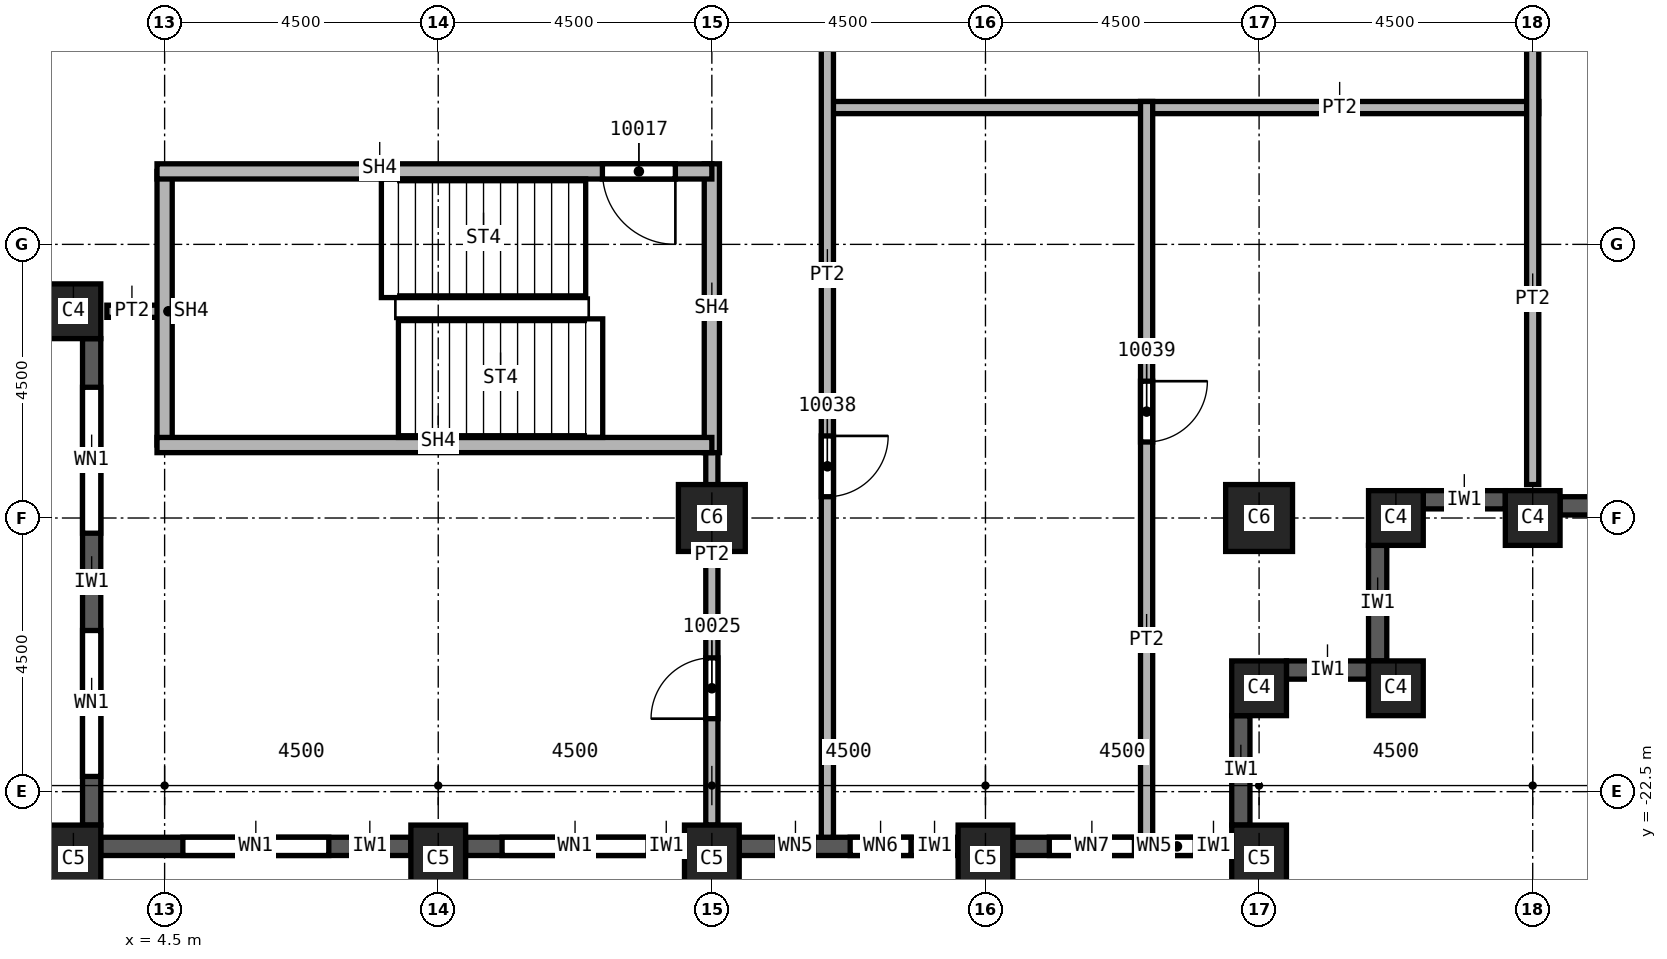
"""IFC4 building model, lengths in metres.
Left out: names, types, materials, properties, quantities, classifications, styles, units other than length and angle.
Written with IfcOpenShell. Run it as: python <this file> out.ifc"""

import sys

from ifc_helpers import new_model, si_unit, direction, frame, frame_2d, origin, origin_2d, place, context, subcontext, project, spatial, rectangle, extrude, element, fill, save


model = new_model("IFC4")
c1 = context("Model", 3, precision=1e-05, world=origin(), true_north=direction((0.0, 1.0)))
c2 = subcontext(c1, "Body", "Model", "MODEL_VIEW")
j1 = project(units=[si_unit("LENGTHUNIT", "METRE"), si_unit("PLANEANGLEUNIT", "RADIAN")], contexts=[c1])
p1 = place(None, origin())
s1 = spatial("IfcSite", under=j1, at=p1, CompositionType="ELEMENT")
p2 = place(p1, origin())
s2 = spatial("IfcBuilding", under=s1, at=p2, CompositionType="ELEMENT")
p3 = place(p2, frame((0.0, 0.0, 174.0)))
s3 = spatial("IfcBuildingStorey", under=s2, at=p3, CompositionType="ELEMENT", Elevation=174.0)
for number, where, z_axis, x_axis in (
    (1, (13.5, -18.0, 0.0), (0.0, 0.0, 1.0), (1.0, 0.0, 0.0)),
    (2, (22.5, -18.0, 0.0), (0.0, 0.0, 1.0), (1.0, 0.0, 0.0)),
):
    element("IfcColumn", number, at=place(p3, frame(where, z_axis=z_axis, x_axis=x_axis)), inside=s3, PredefinedType="COLUMN", context=c2, shape_type="SweptSolid", body=[
        extrude(rectangle(XDim=1.1, YDim=1.1, at=origin_2d()), origin(), (0.0, 0.0, 1.0), 3.59),
    ])
p4 = place(p3, frame((27.0, -18.0, 0.0), z_axis=(0.0, 0.0, 1.0), x_axis=(1.0, 0.0, 0.0)))
e3 = element("IfcColumn", 3, at=p4, inside=s3, PredefinedType="COLUMN", context=c2, shape_type="SweptSolid", body=[
    extrude(rectangle(XDim=0.9, YDim=0.9, at=origin_2d()), origin(), (0.0, 0.0, 1.0), 3.59),
])
for number, where, z_axis, x_axis in (
    (4, (3.0, -23.6, 0.0), (0.0, 0.0, 1.0), (1.0, 0.0, 0.0)),
    (5, (9.0, -23.6, 0.0), (0.0, 0.0, 1.0), (1.0, 0.0, 0.0)),
    (6, (13.5, -23.6, 0.0), (0.0, 0.0, 1.0), (1.0, 0.0, 0.0)),
    (7, (18.0, -23.6, 0.0), (0.0, 0.0, 1.0), (1.0, 0.0, 0.0)),
    (8, (22.5, -23.6, 0.0), (0.0, 0.0, 1.0), (1.0, 0.0, 0.0)),
):
    element("IfcColumn", number, at=place(p3, frame(where, z_axis=z_axis, x_axis=x_axis)), inside=s3, PredefinedType="COLUMN", context=c2, shape_type="SweptSolid", body=[
        extrude(rectangle(XDim=0.9, YDim=1.1, at=origin_2d()), origin(), (0.0, 0.0, 1.0), 3.59),
    ])
for number, where, z_axis, x_axis in (
    (9, (3.0, -14.6, 0.0), (0.0, 0.0, 1.0), (1.0, 0.0, 0.0)),
    (10, (22.5, -20.8, 0.0), (0.0, 0.0, 1.0), (1.0, 0.0, 0.0)),
    (11, (24.75, -20.8, 0.0), (0.0, 0.0, 1.0), (1.0, 0.0, 0.0)),
    (12, (24.75, -18.0, 0.0), (0.0, 0.0, 1.0), (1.0, 0.0, 0.0)),
):
    element("IfcColumn", number, at=place(p3, frame(where, z_axis=z_axis, x_axis=x_axis)), inside=s3, PredefinedType="COLUMN", context=c2, shape_type="SweptSolid", body=[
        extrude(rectangle(XDim=0.9, YDim=0.9, at=origin_2d()), origin(), (0.0, 0.0, 1.0), 3.59),
    ])
p5 = place(p3, frame((3.3, -15.05, 0.0), z_axis=(0.0, 0.0, 1.0), x_axis=(0.0, -1.0, 0.0)))
e13 = element("IfcWall", 13, at=p5, inside=s3, PredefinedType="SOLIDWALL", context=c2, shape_type="SweptSolid", body=[
    extrude(rectangle(XDim=8.0, YDim=0.3, at=frame_2d((4.0, 0.0))), origin(), (0.0, 0.0, 1.0), 2.99),
])
p6 = place(p5, frame((0.8, 0.0, 0.8)))
e14 = element("IfcOpeningElement", 14, at=p6, cuts=e13, PredefinedType="OPENING", context=c2, shape_type="SweptSolid", body=[
    extrude(rectangle(XDim=2.4, YDim=1.95, at=frame_2d((1.2, 0.975))), frame((0.0, 0.15, 0.0), z_axis=(0.0, -1.0, 0.0), x_axis=(1.0, 0.0, 0.0)), (0.0, 0.0, 1.0), 0.3),
])
p7 = place(p5, frame((4.8, 0.0, 0.8)))
e15 = element("IfcOpeningElement", 15, at=p7, cuts=e13, PredefinedType="OPENING", context=c2, shape_type="SweptSolid", body=[
    extrude(rectangle(XDim=2.4, YDim=1.95, at=frame_2d((1.2, 0.975))), frame((0.0, 0.15, 0.0), z_axis=(0.0, -1.0, 0.0), x_axis=(1.0, 0.0, 0.0)), (0.0, 0.0, 1.0), 0.3),
])
p8 = place(p3, frame((3.45, -23.4, 0.0), z_axis=(0.0, 0.0, 1.0), x_axis=(1.0, 0.0, 0.0)))
e16 = element("IfcWall", 16, at=p8, inside=s3, PredefinedType="SOLIDWALL", context=c2, shape_type="SweptSolid", body=[
    extrude(rectangle(XDim=5.1, YDim=0.3, at=frame_2d((2.55, 0.0))), origin(), (0.0, 0.0, 1.0), 2.99),
])
p9 = place(p8, frame((1.35, 0.0, 0.8)))
e17 = element("IfcOpeningElement", 17, at=p9, cuts=e16, PredefinedType="OPENING", context=c2, shape_type="SweptSolid", body=[
    extrude(rectangle(XDim=2.4, YDim=1.95, at=frame_2d((1.2, 0.975))), frame((0.0, 0.15, 0.0), z_axis=(0.0, -1.0, 0.0), x_axis=(1.0, 0.0, 0.0)), (0.0, 0.0, 1.0), 0.3),
])
p10 = place(p3, frame((9.45, -23.4, 0.0), z_axis=(0.0, 0.0, 1.0), x_axis=(1.0, 0.0, 0.0)))
e18 = element("IfcWall", 18, at=p10, inside=s3, PredefinedType="SOLIDWALL", context=c2, shape_type="SweptSolid", body=[
    extrude(rectangle(XDim=3.6, YDim=0.3, at=frame_2d((1.8, 0.0))), origin(), (0.0, 0.0, 1.0), 2.99),
])
p11 = place(p10, frame((0.6, 0.0, 0.8)))
e19 = element("IfcOpeningElement", 19, at=p11, cuts=e18, PredefinedType="OPENING", context=c2, shape_type="SweptSolid", body=[
    extrude(rectangle(XDim=2.4, YDim=1.95, at=frame_2d((1.2, 0.975))), frame((0.0, 0.15, 0.0), z_axis=(0.0, -1.0, 0.0), x_axis=(1.0, 0.0, 0.0)), (0.0, 0.0, 1.0), 0.3),
])
p12 = place(p3, frame((13.95, -23.4, 0.0), z_axis=(0.0, 0.0, 1.0), x_axis=(1.0, 0.0, 0.0)))
e20 = element("IfcWall", 20, at=p12, inside=s3, PredefinedType="SOLIDWALL", context=c2, shape_type="SweptSolid", body=[
    extrude(rectangle(XDim=3.6, YDim=0.3, at=frame_2d((1.8, 0.0))), origin(), (0.0, 0.0, 1.0), 2.99),
])
p13 = place(p12, frame((0.625, 0.0, 0.8)))
e21 = element("IfcOpeningElement", 21, at=p13, cuts=e20, PredefinedType="OPENING", context=c2, shape_type="SweptSolid", body=[
    extrude(rectangle(XDim=0.6, YDim=1.95, at=frame_2d((0.3, 0.975))), frame((0.0, 0.15, 0.0), z_axis=(0.0, -1.0, 0.0), x_axis=(1.0, 0.0, 0.0)), (0.0, 0.0, 1.0), 0.3),
])
p14 = place(p12, frame((1.825, 0.0, 0.8)))
e22 = element("IfcOpeningElement", 22, at=p14, cuts=e20, PredefinedType="OPENING", context=c2, shape_type="SweptSolid", body=[
    extrude(rectangle(XDim=1.0, YDim=1.95, at=frame_2d((0.5, 0.975))), frame((0.0, 0.15, 0.0), z_axis=(0.0, -1.0, 0.0), x_axis=(1.0, 0.0, 0.0)), (0.0, 0.0, 1.0), 0.3),
])
p15 = place(p3, frame((18.45, -23.4, 0.0), z_axis=(0.0, 0.0, 1.0), x_axis=(1.0, 0.0, 0.0)))
e23 = element("IfcWall", 23, at=p15, inside=s3, PredefinedType="SOLIDWALL", context=c2, shape_type="SweptSolid", body=[
    extrude(rectangle(XDim=3.6, YDim=0.3, at=frame_2d((1.8, 0.0))), origin(), (0.0, 0.0, 1.0), 2.99),
])
p16 = place(p15, frame((0.6, 0.0, 0.8)))
e24 = element("IfcOpeningElement", 24, at=p16, cuts=e23, PredefinedType="OPENING", context=c2, shape_type="SweptSolid", body=[
    extrude(rectangle(XDim=1.4, YDim=1.95, at=frame_2d((0.7, 0.975))), frame((0.0, 0.15, 0.0), z_axis=(0.0, -1.0, 0.0), x_axis=(1.0, 0.0, 0.0)), (0.0, 0.0, 1.0), 0.3),
])
p17 = place(p15, frame((2.4, 0.0, 0.8)))
e25 = element("IfcOpeningElement", 25, at=p17, cuts=e23, PredefinedType="OPENING", context=c2, shape_type="SweptSolid", body=[
    extrude(rectangle(XDim=0.6, YDim=1.95, at=frame_2d((0.3, 0.975))), frame((0.0, 0.15, 0.0), z_axis=(0.0, -1.0, 0.0), x_axis=(1.0, 0.0, 0.0)), (0.0, 0.0, 1.0), 0.3),
])
p18 = place(p3, frame((22.2, -23.05, 0.0), z_axis=(0.0, 0.0, 1.0), x_axis=(0.0, 1.0, 0.0)))
e26 = element("IfcWall", 26, at=p18, inside=s3, PredefinedType="SOLIDWALL", context=c2, shape_type="SweptSolid", body=[
    extrude(rectangle(XDim=1.8, YDim=0.3, at=frame_2d((0.9, 0.0))), origin(), (0.0, 0.0, 1.0), 2.99),
])
p19 = place(p3, frame((22.95, -20.5, 0.0), z_axis=(0.0, 0.0, 1.0), x_axis=(1.0, 0.0, 0.0)))
e27 = element("IfcWall", 27, at=p19, inside=s3, PredefinedType="SOLIDWALL", context=c2, shape_type="SweptSolid", body=[
    extrude(rectangle(XDim=1.35, YDim=0.3, at=frame_2d((0.675, 0.0))), origin(), (0.0, 0.0, 1.0), 2.99),
])
p20 = place(p3, frame((24.45, -20.35, 0.0), z_axis=(0.0, 0.0, 1.0), x_axis=(0.0, 1.0, 0.0)))
e28 = element("IfcWall", 28, at=p20, inside=s3, PredefinedType="SOLIDWALL", context=c2, shape_type="SweptSolid", body=[
    extrude(rectangle(XDim=1.9, YDim=0.3, at=frame_2d((0.95, 0.0))), origin(), (0.0, 0.0, 1.0), 2.99),
])
p21 = place(p3, frame((25.2, -17.7, 0.0), z_axis=(0.0, 0.0, 1.0), x_axis=(1.0, 0.0, 0.0)))
e29 = element("IfcWall", 29, at=p21, inside=s3, PredefinedType="SOLIDWALL", context=c2, shape_type="SweptSolid", body=[
    extrude(rectangle(XDim=1.35, YDim=0.3, at=frame_2d((0.675, 0.0))), origin(), (0.0, 0.0, 1.0), 2.99),
])
p22 = place(p3, frame((27.45, -17.8, 0.0), z_axis=(0.0, 0.0, 1.0), x_axis=(1.0, 0.0, 0.0)))
e30 = element("IfcWall", 30, at=p22, inside=s3, PredefinedType="SOLIDWALL", context=c2, shape_type="SweptSolid", body=[
    extrude(rectangle(XDim=3.6, YDim=0.3, at=frame_2d((1.8, 0.0))), origin(), (0.0, 0.0, 1.0), 2.99),
])
p23 = place(p22, frame((0.6, 0.0, 0.8)))
e31 = element("IfcOpeningElement", 31, at=p23, cuts=e30, PredefinedType="OPENING", context=c2, shape_type="SweptSolid", body=[
    extrude(rectangle(XDim=2.4, YDim=1.95, at=frame_2d((1.2, 0.975))), frame((0.0, 0.15, 0.0), z_axis=(0.0, -1.0, 0.0), x_axis=(1.0, 0.0, 0.0)), (0.0, 0.0, 1.0), 0.3),
])
p24 = place(p3, frame((4.5, -14.6, 0.0), z_axis=(0.0, 0.0, 1.0), x_axis=(-1.0, 0.0, 0.0)))
e32 = element("IfcWall", 32, at=p24, inside=s3, PredefinedType="PARTITIONING", context=c2, shape_type="SweptSolid", body=[
    extrude(rectangle(XDim=0.95, YDim=0.2, at=frame_2d((0.475, 0.0))), origin(), (0.0, 0.0, 1.0), 3.59),
])
p25 = place(p3, frame((13.5, -23.05, 0.0), z_axis=(0.0, 0.0, 1.0), x_axis=(0.0, 1.0, 0.0)))
e33 = element("IfcWall", 33, at=p25, inside=s3, PredefinedType="PARTITIONING", context=c2, shape_type="SweptSolid", body=[
    extrude(rectangle(XDim=6.375, YDim=0.2, at=frame_2d((3.188, 0.0))), origin(), (0.0, 0.0, 1.0), 3.59),
])
p26 = place(p25, frame((1.75, 0.0, 0.0)))
e34 = element("IfcOpeningElement", 34, at=p26, cuts=e33, PredefinedType="OPENING", context=c2, shape_type="SweptSolid", body=[
    extrude(rectangle(XDim=1.0, YDim=2.1, at=frame_2d((0.5, 1.05))), frame((0.0, 0.1, 0.0), z_axis=(0.0, -1.0, 0.0), x_axis=(1.0, 0.0, 0.0)), (0.0, 0.0, 1.0), 0.2),
])
p27 = place(p3, frame((15.4, -11.25, 0.0), z_axis=(0.0, 0.0, 1.0), x_axis=(1.0, 0.0, 0.0)))
e35 = element("IfcWall", 35, at=p27, inside=s3, PredefinedType="PARTITIONING", context=c2, shape_type="SweptSolid", body=[
    extrude(rectangle(XDim=11.7, YDim=0.2, at=frame_2d((5.85, 0.0))), origin(), (0.0, 0.0, 1.0), 3.59),
])
p28 = place(p3, frame((15.4, -3.65, 0.0), z_axis=(0.0, 0.0, 1.0), x_axis=(0.0, -1.0, 0.0)))
e36 = element("IfcWall", 36, at=p28, inside=s3, PredefinedType="PARTITIONING", context=c2, shape_type="SweptSolid", body=[
    extrude(rectangle(XDim=19.6, YDim=0.2, at=frame_2d((9.8, 0.0))), origin(), (0.0, 0.0, 1.0), 3.59),
])
p29 = place(p28, frame((13.0, 0.0, 0.0)))
e37 = element("IfcOpeningElement", 37, at=p29, cuts=e36, PredefinedType="OPENING", context=c2, shape_type="SweptSolid", body=[
    extrude(rectangle(XDim=1.0, YDim=2.1, at=frame_2d((0.5, 1.05))), frame((0.0, 0.1, 0.0), z_axis=(0.0, -1.0, 0.0), x_axis=(1.0, 0.0, 0.0)), (0.0, 0.0, 1.0), 0.2),
])
p30 = place(p28, frame((4.0, 0.0, 0.0)))
e38 = element("IfcOpeningElement", 38, at=p30, cuts=e36, PredefinedType="OPENING", context=c2, shape_type="SweptSolid", body=[
    extrude(rectangle(XDim=1.0, YDim=2.1, at=frame_2d((0.5, 1.05))), frame((0.0, 0.1, 0.0), z_axis=(0.0, -1.0, 0.0), x_axis=(1.0, 0.0, 0.0)), (0.0, 0.0, 1.0), 0.2),
])
p31 = place(p3, frame((20.65, -11.15, 0.0), z_axis=(0.0, 0.0, 1.0), x_axis=(0.0, -1.0, 0.0)))
e39 = element("IfcWall", 39, at=p31, inside=s3, PredefinedType="PARTITIONING", context=c2, shape_type="SweptSolid", body=[
    extrude(rectangle(XDim=12.1, YDim=0.2, at=frame_2d((6.05, 0.0))), origin(), (0.0, 0.0, 1.0), 3.59),
])
p32 = place(p31, frame((4.6, 0.0, 0.0)))
e40 = element("IfcOpeningElement", 40, at=p32, cuts=e39, PredefinedType="OPENING", context=c2, shape_type="SweptSolid", body=[
    extrude(rectangle(XDim=1.0, YDim=2.1, at=frame_2d((0.5, 1.05))), frame((0.0, 0.1, 0.0), z_axis=(0.0, -1.0, 0.0), x_axis=(1.0, 0.0, 0.0)), (0.0, 0.0, 1.0), 0.2),
])
p33 = place(p3, frame((27.0, -3.75, 0.0), z_axis=(0.0, 0.0, 1.0), x_axis=(0.0, -1.0, 0.0)))
e41 = element("IfcWall", 41, at=p33, inside=s3, PredefinedType="PARTITIONING", context=c2, shape_type="SweptSolid", body=[
    extrude(rectangle(XDim=13.7, YDim=0.2, at=frame_2d((6.85, 0.0))), origin(), (0.0, 0.0, 1.0), 3.59),
])
p34 = place(p3, frame((4.5, -16.8, 0.0), z_axis=(0.0, 0.0, 1.0), x_axis=(0.0, 1.0, 0.0)))
e42 = element("IfcWall", 42, at=p34, inside=s3, PredefinedType="SOLIDWALL", context=c2, shape_type="SweptSolid", body=[
    extrude(rectangle(XDim=4.5, YDim=0.25, at=frame_2d((2.25, 0.0))), origin(), (0.0, 0.0, 1.0), 3.59),
])
p35 = place(p3, frame((13.5, -16.925, 0.0), z_axis=(0.0, 0.0, 1.0), x_axis=(0.0, 1.0, 0.0)))
e43 = element("IfcWall", 43, at=p35, inside=s3, PredefinedType="SOLIDWALL", context=c2, shape_type="SweptSolid", body=[
    extrude(rectangle(XDim=4.75, YDim=0.25, at=frame_2d((2.375, 0.0))), origin(), (0.0, 0.0, 1.0), 3.59),
])
p36 = place(p3, frame((13.5, -16.8, 0.0), z_axis=(0.0, 0.0, 1.0), x_axis=(-1.0, 0.0, 0.0)))
e44 = element("IfcWall", 44, at=p36, inside=s3, PredefinedType="SOLIDWALL", context=c2, shape_type="SweptSolid", body=[
    extrude(rectangle(XDim=9.125, YDim=0.25, at=frame_2d((4.562, 0.0))), origin(), (0.0, 0.0, 1.0), 3.59),
])
p37 = place(p3, frame((13.5, -12.3, 0.0), z_axis=(0.0, 0.0, 1.0), x_axis=(-1.0, 0.0, 0.0)))
e45 = element("IfcWall", 45, at=p37, inside=s3, PredefinedType="SOLIDWALL", context=c2, shape_type="SweptSolid", body=[
    extrude(rectangle(XDim=9.125, YDim=0.25, at=frame_2d((4.562, 0.0))), origin(), (0.0, 0.0, 1.0), 3.59),
])
p38 = place(p37, frame((0.6, 0.0, 0.0)))
e46 = element("IfcOpeningElement", 46, at=p38, cuts=e45, PredefinedType="OPENING", context=c2, shape_type="SweptSolid", body=[
    extrude(rectangle(XDim=1.2, YDim=2.1, at=frame_2d((0.6, 1.05))), frame((0.0, 0.125, 0.0), z_axis=(0.0, -1.0, 0.0), x_axis=(1.0, 0.0, 0.0)), (0.0, 0.0, 1.0), 0.25),
])
p39 = place(p6, origin())
e47 = element("IfcWindow", 47, at=p39, inside=s3, PartitioningType="SINGLE_PANEL", PredefinedType="WINDOW", context=c2, shape_type="SweptSolid", body=[
    extrude(rectangle(XDim=2.4, YDim=1.95, at=frame_2d((1.2, 0.975))), frame((0.0, 0.03, 0.0), z_axis=(0.0, -1.0, 0.0), x_axis=(1.0, 0.0, 0.0)), (0.0, 0.0, 1.0), 0.06),
])
fill(e14, e47)
p40 = place(p7, origin())
e48 = element("IfcWindow", 48, at=p40, inside=s3, PartitioningType="SINGLE_PANEL", PredefinedType="WINDOW", context=c2, shape_type="SweptSolid", body=[
    extrude(rectangle(XDim=2.4, YDim=1.95, at=frame_2d((1.2, 0.975))), frame((0.0, 0.03, 0.0), z_axis=(0.0, -1.0, 0.0), x_axis=(1.0, 0.0, 0.0)), (0.0, 0.0, 1.0), 0.06),
])
fill(e15, e48)
p41 = place(p9, origin())
e49 = element("IfcWindow", 49, at=p41, inside=s3, PartitioningType="SINGLE_PANEL", PredefinedType="WINDOW", context=c2, shape_type="SweptSolid", body=[
    extrude(rectangle(XDim=2.4, YDim=1.95, at=frame_2d((1.2, 0.975))), frame((0.0, 0.03, 0.0), z_axis=(0.0, -1.0, 0.0), x_axis=(1.0, 0.0, 0.0)), (0.0, 0.0, 1.0), 0.06),
])
fill(e17, e49)
p42 = place(p11, origin())
e50 = element("IfcWindow", 50, at=p42, inside=s3, PartitioningType="SINGLE_PANEL", PredefinedType="WINDOW", context=c2, shape_type="SweptSolid", body=[
    extrude(rectangle(XDim=2.4, YDim=1.95, at=frame_2d((1.2, 0.975))), frame((0.0, 0.03, 0.0), z_axis=(0.0, -1.0, 0.0), x_axis=(1.0, 0.0, 0.0)), (0.0, 0.0, 1.0), 0.06),
])
fill(e19, e50)
p43 = place(p38, origin())
e51 = element("IfcDoor", 51, at=p43, inside=s3, OperationType="SINGLE_SWING_RIGHT", PredefinedType="DOOR", context=c2, shape_type="SweptSolid", body=[
    extrude(rectangle(XDim=1.2, YDim=2.1, at=frame_2d((0.6, 1.05))), frame((0.0, 0.025, 0.0), z_axis=(0.0, -1.0, 0.0), x_axis=(1.0, 0.0, 0.0)), (0.0, 0.0, 1.0), 0.05),
])
fill(e46, e51)
p44 = place(p26, origin())
e52 = element("IfcDoor", 52, at=p44, inside=s3, OperationType="SINGLE_SWING_RIGHT", PredefinedType="DOOR", context=c2, shape_type="SweptSolid", body=[
    extrude(rectangle(XDim=1.0, YDim=2.1, at=frame_2d((0.5, 1.05))), frame((0.0, 0.025, 0.0), z_axis=(0.0, -1.0, 0.0), x_axis=(1.0, 0.0, 0.0)), (0.0, 0.0, 1.0), 0.05),
])
fill(e34, e52)
p45 = place(p29, origin())
e53 = element("IfcDoor", 53, at=p45, inside=s3, OperationType="SINGLE_SWING_LEFT", PredefinedType="DOOR", context=c2, shape_type="SweptSolid", body=[
    extrude(rectangle(XDim=1.0, YDim=2.1, at=frame_2d((0.5, 1.05))), frame((0.0, 0.025, 0.0), z_axis=(0.0, -1.0, 0.0), x_axis=(1.0, 0.0, 0.0)), (0.0, 0.0, 1.0), 0.05),
])
fill(e37, e53)
p46 = place(p32, origin())
e54 = element("IfcDoor", 54, at=p46, inside=s3, OperationType="SINGLE_SWING_RIGHT", PredefinedType="DOOR", context=c2, shape_type="SweptSolid", body=[
    extrude(rectangle(XDim=1.0, YDim=2.1, at=frame_2d((0.5, 1.05))), frame((0.0, 0.025, 0.0), z_axis=(0.0, -1.0, 0.0), x_axis=(1.0, 0.0, 0.0)), (0.0, 0.0, 1.0), 0.05),
])
fill(e40, e54)
p47 = place(p13, origin())
e55 = element("IfcWindow", 55, at=p47, inside=s3, PartitioningType="SINGLE_PANEL", PredefinedType="WINDOW", context=c2, shape_type="SweptSolid", body=[
    extrude(rectangle(XDim=0.6, YDim=1.95, at=frame_2d((0.3, 0.975))), frame((0.0, 0.03, 0.0), z_axis=(0.0, -1.0, 0.0), x_axis=(1.0, 0.0, 0.0)), (0.0, 0.0, 1.0), 0.06),
])
fill(e21, e55)
p48 = place(p14, origin())
e56 = element("IfcWindow", 56, at=p48, inside=s3, PartitioningType="SINGLE_PANEL", PredefinedType="WINDOW", context=c2, shape_type="SweptSolid", body=[
    extrude(rectangle(XDim=1.0, YDim=1.95, at=frame_2d((0.5, 0.975))), frame((0.0, 0.03, 0.0), z_axis=(0.0, -1.0, 0.0), x_axis=(1.0, 0.0, 0.0)), (0.0, 0.0, 1.0), 0.06),
])
fill(e22, e56)
p49 = place(p16, origin())
e57 = element("IfcWindow", 57, at=p49, inside=s3, PartitioningType="SINGLE_PANEL", PredefinedType="WINDOW", context=c2, shape_type="SweptSolid", body=[
    extrude(rectangle(XDim=1.4, YDim=1.95, at=frame_2d((0.7, 0.975))), frame((0.0, 0.03, 0.0), z_axis=(0.0, -1.0, 0.0), x_axis=(1.0, 0.0, 0.0)), (0.0, 0.0, 1.0), 0.06),
])
fill(e24, e57)
p50 = place(p17, origin())
e58 = element("IfcWindow", 58, at=p50, inside=s3, PartitioningType="SINGLE_PANEL", PredefinedType="WINDOW", context=c2, shape_type="SweptSolid", body=[
    extrude(rectangle(XDim=0.6, YDim=1.95, at=frame_2d((0.3, 0.975))), frame((0.0, 0.03, 0.0), z_axis=(0.0, -1.0, 0.0), x_axis=(1.0, 0.0, 0.0)), (0.0, 0.0, 1.0), 0.06),
])
fill(e25, e58)
save(model, sys.argv[1])
